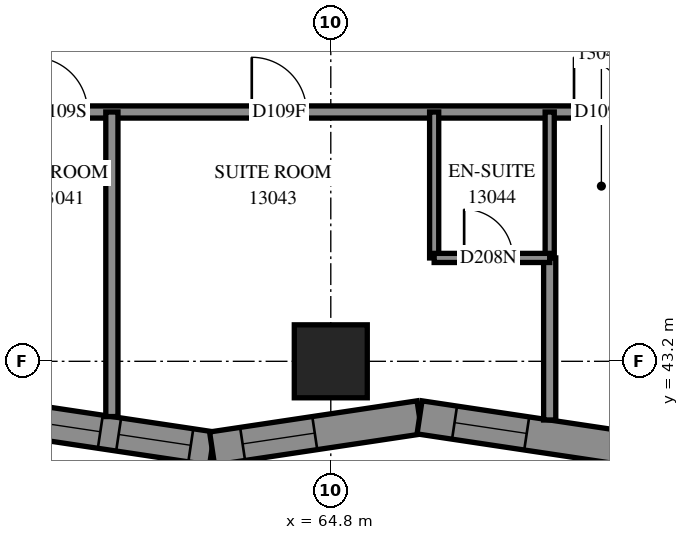
"""IFC4 building model, lengths in metres.
Left out: names, types, materials, properties, quantities, classifications, styles, units other than length and angle.
Written with IfcOpenShell. Run it as: python <this file> out.ifc"""

import sys

from ifc_helpers import new_model, si_unit, direction, frame, frame_2d, origin, origin_2d, place, context, subcontext, project, spatial, polyline, rectangle, outline, extrude, element, fill, save


model = new_model("IFC4")
c1 = context("Model", 3, precision=1e-05, world=origin(), true_north=direction((0.0, 1.0)))
c2 = subcontext(c1, "Body", "Model", "MODEL_VIEW")
j1 = project(units=[si_unit("LENGTHUNIT", "METRE"), si_unit("PLANEANGLEUNIT", "RADIAN")], contexts=[c1])
p1 = place(None, origin())
s1 = spatial("IfcSite", under=j1, at=p1, CompositionType="ELEMENT")
p2 = place(p1, origin())
s2 = spatial("IfcBuilding", under=s1, at=p2, CompositionType="ELEMENT")
p3 = place(p2, frame((0.0, 0.0, 50.8)))
s3 = spatial("IfcBuildingStorey", under=s2, at=p3, CompositionType="ELEMENT", Elevation=50.8)
p4 = place(p3, frame((64.8, 43.2, 0.0), z_axis=(0.0, 0.0, 1.0), x_axis=(1.0, 0.0, 0.0)))
e1 = element("IfcColumn", 1, at=p4, inside=s3, PredefinedType="COLUMN", context=c2, shape_type="SweptSolid", body=[
    extrude(rectangle(XDim=1.2, YDim=1.2, at=origin_2d()), origin(), (0.0, 0.0, 1.0), 3.1),
])
p5 = place(p3, frame((59.436, 42.278, 0.0), z_axis=(0.0, 0.0, 1.0), x_axis=(0.9889272091, -0.1484013984, 0.0)))
e2 = element("IfcWall", 2, at=p5, inside=s3, PredefinedType="SOLIDWALL", context=c2, shape_type="SweptSolid", body=[
    extrude(outline(polyline([(0.041, -0.275), (3.491, -0.275), (3.409, 0.275), (-0.041, 0.275), (0.041, -0.275)])), origin(), (0.0, 0.0, 1.0), 3.1),
])
p6 = place(p5, frame((0.392, 0.0, 0.5)))
e3 = element("IfcOpeningElement", 3, at=p6, cuts=e2, PredefinedType="OPENING", context=c2, shape_type="SweptSolid", body=[
    extrude(rectangle(XDim=1.2, YDim=2.45, at=frame_2d((0.6, 1.225))), frame((0.0, 0.285, 0.0), z_axis=(0.0, -1.0, 0.0), x_axis=(1.0, 0.0, 0.0)), (0.0, 0.0, 1.0), 0.57),
])
p7 = place(p5, frame((1.896, 0.0, 0.5)))
e4 = element("IfcOpeningElement", 4, at=p7, cuts=e2, PredefinedType="OPENING", context=c2, shape_type="SweptSolid", body=[
    extrude(rectangle(XDim=1.2, YDim=2.45, at=frame_2d((0.6, 1.225))), frame((0.0, 0.285, 0.0), z_axis=(0.0, -1.0, 0.0), x_axis=(1.0, 0.0, 0.0)), (0.0, 0.0, 1.0), 0.57),
])
p8 = place(p3, frame((62.848, 41.766, 0.0), z_axis=(0.0, 0.0, 1.0), x_axis=(0.9889278474, 0.1483971447, 0.0)))
e5 = element("IfcWall", 5, at=p8, inside=s3, PredefinedType="SOLIDWALL", context=c2, shape_type="SweptSolid", body=[
    extrude(outline(polyline([(-0.041, -0.275), (3.409, -0.275), (3.491, 0.275), (0.041, 0.275), (-0.041, -0.275)])), origin(), (0.0, 0.0, 1.0), 3.1),
])
p9 = place(p8, frame((0.508, 0.0, 0.5)))
e6 = element("IfcOpeningElement", 6, at=p9, cuts=e5, PredefinedType="OPENING", context=c2, shape_type="SweptSolid", body=[
    extrude(rectangle(XDim=1.2, YDim=2.45, at=frame_2d((0.6, 1.225))), frame((0.0, 0.285, 0.0), z_axis=(0.0, -1.0, 0.0), x_axis=(1.0, 0.0, 0.0)), (0.0, 0.0, 1.0), 0.57),
])
p10 = place(p3, frame((66.26, 42.278, 0.0), z_axis=(0.0, 0.0, 1.0), x_axis=(0.9889272091, -0.1484013984, 0.0)))
e7 = element("IfcWall", 7, at=p10, inside=s3, PredefinedType="SOLIDWALL", context=c2, shape_type="SweptSolid", body=[
    extrude(outline(polyline([(0.041, -0.275), (3.491, -0.275), (3.409, 0.275), (-0.041, 0.275), (0.041, -0.275)])), origin(), (0.0, 0.0, 1.0), 3.1),
])
p11 = place(p10, frame((0.582, 0.0, 0.5)))
e8 = element("IfcOpeningElement", 8, at=p11, cuts=e7, PredefinedType="OPENING", context=c2, shape_type="SweptSolid", body=[
    extrude(rectangle(XDim=1.2, YDim=2.45, at=frame_2d((0.6, 1.225))), frame((0.0, 0.285, 0.0), z_axis=(0.0, -1.0, 0.0), x_axis=(1.0, 0.0, 0.0)), (0.0, 0.0, 1.0), 0.57),
])
p12 = place(p3, frame((54.5, 47.3, 0.0), z_axis=(0.0, 0.0, 1.0), x_axis=(1.0, 0.0, 0.0)))
e9 = element("IfcWall", 9, at=p12, inside=s3, PredefinedType="PARTITIONING", context=c2, shape_type="SweptSolid", body=[
    extrude(rectangle(XDim=19.56, YDim=0.2, at=frame_2d((9.78, 0.0))), origin(), (0.0, 0.0, 1.0), 3.1),
])
p13 = place(p12, frame((0.23, 0.0, 0.0)))
e10 = element("IfcOpeningElement", 10, at=p13, cuts=e9, PredefinedType="OPENING", context=c2, shape_type="SweptSolid", body=[
    extrude(rectangle(XDim=1.0, YDim=2.1, at=frame_2d((0.5, 1.05))), frame((0.0, 0.11, 0.0), z_axis=(0.0, -1.0, 0.0), x_axis=(1.0, 0.0, 0.0)), (0.0, 0.0, 1.0), 0.22),
])
p14 = place(p12, frame((5.4, 0.0, 0.0)))
e11 = element("IfcOpeningElement", 11, at=p14, cuts=e9, PredefinedType="OPENING", context=c2, shape_type="SweptSolid", body=[
    extrude(rectangle(XDim=0.9, YDim=2.1, at=frame_2d((0.45, 1.05))), frame((0.0, 0.11, 0.0), z_axis=(0.0, -1.0, 0.0), x_axis=(1.0, 0.0, 0.0)), (0.0, 0.0, 1.0), 0.22),
])
p15 = place(p12, frame((9.001, 0.0, 0.0)))
e12 = element("IfcOpeningElement", 12, at=p15, cuts=e9, PredefinedType="OPENING", context=c2, shape_type="SweptSolid", body=[
    extrude(rectangle(XDim=0.9, YDim=2.1, at=frame_2d((0.45, 1.05))), frame((0.0, 0.11, 0.0), z_axis=(0.0, -1.0, 0.0), x_axis=(1.0, 0.0, 0.0)), (0.0, 0.0, 1.0), 0.22),
])
p16 = place(p12, frame((14.3, 0.0, 0.0)))
e13 = element("IfcOpeningElement", 13, at=p16, cuts=e9, PredefinedType="OPENING", context=c2, shape_type="SweptSolid", body=[
    extrude(rectangle(XDim=0.9, YDim=2.1, at=frame_2d((0.45, 1.05))), frame((0.0, 0.11, 0.0), z_axis=(0.0, -1.0, 0.0), x_axis=(1.0, 0.0, 0.0)), (0.0, 0.0, 1.0), 0.22),
])
p17 = place(p3, frame((61.2, 42.291, 0.0), z_axis=(0.0, 0.0, 1.0), x_axis=(0.0, 1.0, 0.0)))
e14 = element("IfcWall", 14, at=p17, inside=s3, PredefinedType="PARTITIONING", context=c2, shape_type="SweptSolid", body=[
    extrude(rectangle(XDim=5.009, YDim=0.2, at=frame_2d((2.504, 0.0))), origin(), (0.0, 0.0, 1.0), 3.1),
])
p18 = place(p3, frame((68.4, 42.235, 0.0), z_axis=(0.0, 0.0, 1.0), x_axis=(0.0, 1.0, 0.0)))
e15 = element("IfcWall", 15, at=p18, inside=s3, PredefinedType="PARTITIONING", context=c2, shape_type="SweptSolid", body=[
    extrude(rectangle(XDim=2.665, YDim=0.2, at=frame_2d((1.333, 0.0))), origin(), (0.0, 0.0, 1.0), 3.1),
])
for number, where, z_axis, x_axis in (
    (16, (66.5, 44.9, 0.0), (0.0, 0.0, 1.0), (0.0, 1.0, 0.0)),
    (17, (68.4, 44.9, 0.0), (0.0, 0.0, 1.0), (0.0, 1.0, 0.0)),
):
    element("IfcWall", number, at=place(p3, frame(where, z_axis=z_axis, x_axis=x_axis)), inside=s3, PredefinedType="PARTITIONING", context=c2, shape_type="SweptSolid", body=[
        extrude(rectangle(XDim=2.4, YDim=0.15, at=frame_2d((1.2, 0.0))), origin(), (0.0, 0.0, 1.0), 3.1),
    ])
p19 = place(p3, frame((66.5, 44.9, 0.0), z_axis=(0.0, 0.0, 1.0), x_axis=(1.0, 0.0, 0.0)))
e18 = element("IfcWall", 18, at=p19, inside=s3, PredefinedType="PARTITIONING", context=c2, shape_type="SweptSolid", body=[
    extrude(rectangle(XDim=1.9, YDim=0.15, at=frame_2d((0.95, 0.0))), origin(), (0.0, 0.0, 1.0), 3.1),
])
p20 = place(p19, frame((0.493, 0.0, 0.0)))
e19 = element("IfcOpeningElement", 19, at=p20, cuts=e18, PredefinedType="OPENING", context=c2, shape_type="SweptSolid", body=[
    extrude(rectangle(XDim=0.8, YDim=2.1, at=frame_2d((0.4, 1.05))), frame((0.0, 0.085, 0.0), z_axis=(0.0, -1.0, 0.0), x_axis=(1.0, 0.0, 0.0)), (0.0, 0.0, 1.0), 0.17),
])
p21 = place(p6, origin())
e20 = element("IfcWindow", 20, at=p21, inside=s3, PartitioningType="SINGLE_PANEL", PredefinedType="WINDOW", context=c2, shape_type="SweptSolid", body=[
    extrude(rectangle(XDim=1.2, YDim=2.45, at=frame_2d((0.6, 1.225))), frame((0.0, 0.155, 0.0), z_axis=(0.0, -1.0, 0.0), x_axis=(1.0, 0.0, 0.0)), (0.0, 0.0, 1.0), 0.06),
])
fill(e3, e20)
p22 = place(p7, origin())
e21 = element("IfcWindow", 21, at=p22, inside=s3, PartitioningType="SINGLE_PANEL", PredefinedType="WINDOW", context=c2, shape_type="SweptSolid", body=[
    extrude(rectangle(XDim=1.2, YDim=2.45, at=frame_2d((0.6, 1.225))), frame((0.0, 0.155, 0.0), z_axis=(0.0, -1.0, 0.0), x_axis=(1.0, 0.0, 0.0)), (0.0, 0.0, 1.0), 0.06),
])
fill(e4, e21)
p23 = place(p9, origin())
e22 = element("IfcWindow", 22, at=p23, inside=s3, PartitioningType="SINGLE_PANEL", PredefinedType="WINDOW", context=c2, shape_type="SweptSolid", body=[
    extrude(rectangle(XDim=1.2, YDim=2.45, at=frame_2d((0.6, 1.225))), frame((0.0, 0.155, 0.0), z_axis=(0.0, -1.0, 0.0), x_axis=(1.0, 0.0, 0.0)), (0.0, 0.0, 1.0), 0.06),
])
fill(e6, e22)
p24 = place(p11, origin())
e23 = element("IfcWindow", 23, at=p24, inside=s3, PartitioningType="SINGLE_PANEL", PredefinedType="WINDOW", context=c2, shape_type="SweptSolid", body=[
    extrude(rectangle(XDim=1.2, YDim=2.45, at=frame_2d((0.6, 1.225))), frame((0.0, 0.155, 0.0), z_axis=(0.0, -1.0, 0.0), x_axis=(1.0, 0.0, 0.0)), (0.0, 0.0, 1.0), 0.06),
])
fill(e8, e23)
p25 = place(p14, origin())
e24 = element("IfcDoor", 24, at=p25, inside=s3, OperationType="SINGLE_SWING_LEFT", PredefinedType="DOOR", context=c2, shape_type="SweptSolid", body=[
    extrude(rectangle(XDim=0.9, YDim=2.1, at=frame_2d((0.45, 1.05))), frame((0.0, 0.025, 0.0), z_axis=(0.0, -1.0, 0.0), x_axis=(1.0, 0.0, 0.0)), (0.0, 0.0, 1.0), 0.05),
])
fill(e11, e24)
p26 = place(p15, origin())
e25 = element("IfcDoor", 25, at=p26, inside=s3, OperationType="SINGLE_SWING_RIGHT", PredefinedType="DOOR", context=c2, shape_type="SweptSolid", body=[
    extrude(rectangle(XDim=0.9, YDim=2.1, at=frame_2d((0.45, 1.05))), frame((0.0, 0.025, 0.0), z_axis=(0.0, -1.0, 0.0), x_axis=(1.0, 0.0, 0.0)), (0.0, 0.0, 1.0), 0.05),
])
fill(e12, e25)
p27 = place(p20, origin())
e26 = element("IfcDoor", 26, at=p27, inside=s3, OperationType="SINGLE_SWING_RIGHT", PredefinedType="DOOR", context=c2, shape_type="SweptSolid", body=[
    extrude(rectangle(XDim=0.8, YDim=2.1, at=frame_2d((0.4, 1.05))), frame((0.0, 0.025, 0.0), z_axis=(0.0, -1.0, 0.0), x_axis=(1.0, 0.0, 0.0)), (0.0, 0.0, 1.0), 0.05),
])
fill(e19, e26)
p28 = place(p16, origin())
e27 = element("IfcDoor", 27, at=p28, inside=s3, OperationType="SINGLE_SWING_RIGHT", PredefinedType="DOOR", context=c2, shape_type="SweptSolid", body=[
    extrude(rectangle(XDim=0.9, YDim=2.1, at=frame_2d((0.45, 1.05))), frame((0.0, 0.025, 0.0), z_axis=(0.0, -1.0, 0.0), x_axis=(1.0, 0.0, 0.0)), (0.0, 0.0, 1.0), 0.05),
])
fill(e13, e27)
save(model, sys.argv[1])
